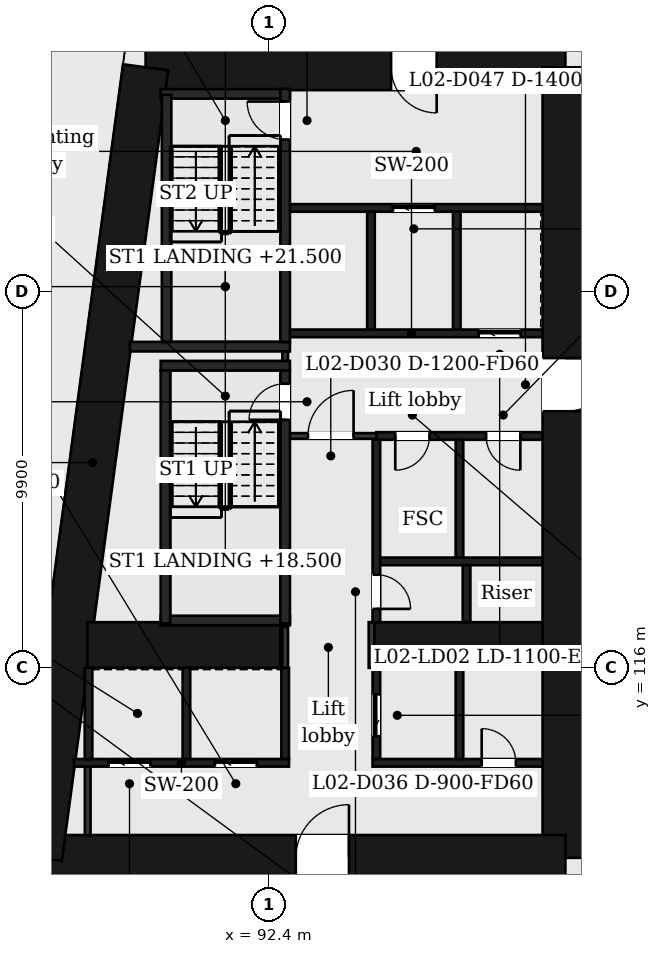
"""IFC4 building model, lengths in metres.
Left out: names, types, materials, properties, quantities, classifications, styles, units other than length and angle.
Written with IfcOpenShell. Run it as: python <this file> out.ifc"""

import sys

from ifc_helpers import new_model, si_unit, direction, frame, frame_2d, origin, place, context, subcontext, project, spatial, rectangle, extrude, element, fill, save


model = new_model("IFC4")
c1 = context("Model", 3, precision=1e-05, world=origin(), true_north=direction((0.0, 1.0)))
c2 = subcontext(c1, "Body", "Model", "MODEL_VIEW")
j1 = project(units=[si_unit("LENGTHUNIT", "METRE"), si_unit("PLANEANGLEUNIT", "RADIAN")], contexts=[c1])
p1 = place(None, origin())
s1 = spatial("IfcSite", under=j1, at=p1, CompositionType="ELEMENT")
p2 = place(p1, origin())
s2 = spatial("IfcBuilding", under=s1, at=p2, CompositionType="ELEMENT")
p3 = place(p2, frame((0.0, 0.0, 17.0)))
s3 = spatial("IfcBuildingStorey", under=s2, at=p3, CompositionType="ELEMENT", Elevation=17.0)
p4 = place(p3, frame((89.156, 131.8, 0.0), z_axis=(0.0, 0.0, 1.0), x_axis=(1.0, 0.0, 0.0)))
e1 = element("IfcWall", 1, at=p4, inside=s3, PredefinedType="SHEAR", context=c2, shape_type="SweptSolid", body=[
    extrude(rectangle(XDim=11.044, YDim=1.2, at=frame_2d((5.522, 0.0))), origin(), (0.0, 0.0, 1.0), 6.0),
])
p5 = place(p4, frame((6.458, 0.0, 0.0)))
e2 = element("IfcOpeningElement", 2, at=p5, cuts=e1, PredefinedType="OPENING", context=c2, shape_type="SweptSolid", body=[
    extrude(rectangle(XDim=1.2, YDim=2.1, at=frame_2d((0.6, 1.05))), frame((0.0, 0.61, 0.0), z_axis=(0.0, -1.0, 0.0), x_axis=(1.0, 0.0, 0.0)), (0.0, 0.0, 1.0), 1.22),
])
p6 = place(p3, frame((100.2, 131.8, 0.0), z_axis=(0.0, 0.0, 1.0), x_axis=(0.0, -1.0, 0.0)))
e3 = element("IfcWall", 3, at=p6, inside=s3, PredefinedType="SHEAR", context=c2, shape_type="SweptSolid", body=[
    extrude(rectangle(XDim=20.8, YDim=1.2, at=frame_2d((10.4, 0.0))), origin(), (0.0, 0.0, 1.0), 6.0),
])
p7 = place(p6, frame((7.65, 0.0, 0.0)))
e4 = element("IfcOpeningElement", 4, at=p7, cuts=e3, PredefinedType="OPENING", context=c2, shape_type="SweptSolid", body=[
    extrude(rectangle(XDim=1.4, YDim=2.1, at=frame_2d((0.7, 1.05))), frame((0.0, 0.61, 0.0), z_axis=(0.0, -1.0, 0.0), x_axis=(1.0, 0.0, 0.0)), (0.0, 0.0, 1.0), 1.22),
])
p8 = place(p3, frame((100.2, 111.0, 0.0), z_axis=(0.0, 0.0, 1.0), x_axis=(-1.0, 0.0, 0.0)))
e5 = element("IfcWall", 5, at=p8, inside=s3, PredefinedType="SHEAR", context=c2, shape_type="SweptSolid", body=[
    extrude(rectangle(XDim=13.844, YDim=1.2, at=frame_2d((6.922, 0.0))), origin(), (0.0, 0.0, 1.0), 6.0),
])
p9 = place(p8, frame((5.694, 0.0, 0.0)))
e6 = element("IfcOpeningElement", 6, at=p9, cuts=e5, PredefinedType="OPENING", context=c2, shape_type="SweptSolid", body=[
    extrude(rectangle(XDim=1.4, YDim=2.1, at=frame_2d((0.7, 1.05))), frame((0.0, 0.61, 0.0), z_axis=(0.0, -1.0, 0.0), x_axis=(1.0, 0.0, 0.0)), (0.0, 0.0, 1.0), 1.22),
])
p10 = place(p3, frame((86.355, 111.0, 0.0), z_axis=(0.0, 0.0, 1.0), x_axis=(0.133413989637, 0.99106039542, 0.0)))
e7 = element("IfcWall", 7, at=p10, inside=s3, PredefinedType="SHEAR", context=c2, shape_type="SweptSolid", body=[
    extrude(rectangle(XDim=20.988, YDim=1.2, at=frame_2d((10.494, 0.0))), origin(), (0.0, 0.0, 1.0), 6.0),
])
p11 = place(p3, frame((87.623, 116.6, 0.0), z_axis=(0.0, 0.0, 1.0), x_axis=(1.0, 0.0, 0.0)))
e8 = element("IfcWall", 8, at=p11, inside=s3, PredefinedType="SHEAR", context=c2, shape_type="SweptSolid", body=[
    extrude(rectangle(XDim=5.077, YDim=1.2, at=frame_2d((2.539, 0.0))), origin(), (0.0, 0.0, 1.0), 6.0),
])
p12 = place(p3, frame((95.1, 116.6, 0.0), z_axis=(0.0, 0.0, 1.0), x_axis=(1.0, 0.0, 0.0)))
e9 = element("IfcWall", 9, at=p12, inside=s3, PredefinedType="SHEAR", context=c2, shape_type="SweptSolid", body=[
    extrude(rectangle(XDim=4.5, YDim=1.2, at=frame_2d((2.25, 0.0))), origin(), (0.0, 0.0, 1.0), 6.0),
])
p13 = place(p3, frame((87.267, 113.5, 0.0), z_axis=(0.0, 0.0, 1.0), x_axis=(1.0, 0.0, 0.0)))
e10 = element("IfcWall", 10, at=p13, inside=s3, PredefinedType="PARTITIONING", context=c2, shape_type="SweptSolid", body=[
    extrude(rectangle(XDim=5.66, YDim=0.2, at=frame_2d((2.83, 0.0))), origin(), (0.0, 0.0, 1.0), 5.5),
])
p14 = place(p13, frame((0.914, 0.0, 0.0)))
e11 = element("IfcOpeningElement", 11, at=p14, cuts=e10, PredefinedType="OPENING", context=c2, shape_type="SweptSolid", body=[
    extrude(rectangle(XDim=1.1, YDim=2.1, at=frame_2d((0.55, 1.05))), frame((0.0, 0.11, 0.0), z_axis=(0.0, -1.0, 0.0), x_axis=(1.0, 0.0, 0.0)), (0.0, 0.0, 1.0), 0.22),
])
p15 = place(p13, frame((3.711, 0.0, 0.0)))
e12 = element("IfcOpeningElement", 12, at=p15, cuts=e10, PredefinedType="OPENING", context=c2, shape_type="SweptSolid", body=[
    extrude(rectangle(XDim=1.1, YDim=2.1, at=frame_2d((0.55, 1.05))), frame((0.0, 0.11, 0.0), z_axis=(0.0, -1.0, 0.0), x_axis=(1.0, 0.0, 0.0)), (0.0, 0.0, 1.0), 0.22),
])
p16 = place(p3, frame((95.127, 113.5, 0.0), z_axis=(0.0, 0.0, 1.0), x_axis=(1.0, 0.0, 0.0)))
e13 = element("IfcWall", 13, at=p16, inside=s3, PredefinedType="PARTITIONING", context=c2, shape_type="SweptSolid", body=[
    extrude(rectangle(XDim=4.473, YDim=0.2, at=frame_2d((2.237, 0.0))), origin(), (0.0, 0.0, 1.0), 5.5),
])
p17 = place(p16, frame((2.871, 0.0, 0.0)))
e14 = element("IfcOpeningElement", 14, at=p17, cuts=e13, PredefinedType="OPENING", context=c2, shape_type="SweptSolid", body=[
    extrude(rectangle(XDim=0.9, YDim=2.1, at=frame_2d((0.45, 1.05))), frame((0.0, 0.11, 0.0), z_axis=(0.0, -1.0, 0.0), x_axis=(1.0, 0.0, 0.0)), (0.0, 0.0, 1.0), 0.22),
])
p18 = place(p3, frame((89.552, 117.245, 0.0), z_axis=(0.0, 0.0, 1.0), x_axis=(1.0, 0.0, 0.0)))
e15 = element("IfcWall", 15, at=p18, inside=s3, PredefinedType="PARTITIONING", context=c2, shape_type="SweptSolid", body=[
    extrude(rectangle(XDim=3.4, YDim=0.25, at=frame_2d((1.7, 0.0))), origin(), (0.0, 0.0, 1.0), 5.5),
])
p19 = place(p3, frame((95.227, 118.8, 0.0), z_axis=(0.0, 0.0, 1.0), x_axis=(1.0, 0.0, 0.0)))
e16 = element("IfcWall", 16, at=p19, inside=s3, PredefinedType="PARTITIONING", context=c2, shape_type="SweptSolid", body=[
    extrude(rectangle(XDim=4.373, YDim=0.2, at=frame_2d((2.187, 0.0))), origin(), (0.0, 0.0, 1.0), 5.5),
])
p20 = place(p3, frame((95.227, 122.1, 0.0), z_axis=(0.0, 0.0, 1.0), x_axis=(1.0, 0.0, 0.0)))
e17 = element("IfcWall", 17, at=p20, inside=s3, PredefinedType="PARTITIONING", context=c2, shape_type="SweptSolid", body=[
    extrude(rectangle(XDim=4.373, YDim=0.2, at=frame_2d((2.187, 0.0))), origin(), (0.0, 0.0, 1.0), 5.5),
])
p21 = place(p20, frame((0.497, 0.0, 0.0)))
e18 = element("IfcOpeningElement", 18, at=p21, cuts=e17, PredefinedType="OPENING", context=c2, shape_type="SweptSolid", body=[
    extrude(rectangle(XDim=0.9, YDim=2.1, at=frame_2d((0.45, 1.05))), frame((0.0, 0.11, 0.0), z_axis=(0.0, -1.0, 0.0), x_axis=(1.0, 0.0, 0.0)), (0.0, 0.0, 1.0), 0.22),
])
p22 = place(p20, frame((2.888, 0.0, 0.0)))
e19 = element("IfcOpeningElement", 19, at=p22, cuts=e17, PredefinedType="OPENING", context=c2, shape_type="SweptSolid", body=[
    extrude(rectangle(XDim=0.9, YDim=2.1, at=frame_2d((0.45, 1.05))), frame((0.0, 0.11, 0.0), z_axis=(0.0, -1.0, 0.0), x_axis=(1.0, 0.0, 0.0)), (0.0, 0.0, 1.0), 0.22),
])
p23 = place(p3, frame((92.827, 122.1, 0.0), z_axis=(0.0, 0.0, 1.0), x_axis=(1.0, 0.0, 0.0)))
e20 = element("IfcWall", 20, at=p23, inside=s3, PredefinedType="PARTITIONING", context=c2, shape_type="SweptSolid", body=[
    extrude(rectangle(XDim=2.4, YDim=0.15, at=frame_2d((1.2, 0.0))), origin(), (0.0, 0.0, 1.0), 5.5),
])
p24 = place(p23, frame((0.6, 0.0, 0.0)))
e21 = element("IfcOpeningElement", 21, at=p24, cuts=e20, PredefinedType="OPENING", context=c2, shape_type="SweptSolid", body=[
    extrude(rectangle(XDim=1.2, YDim=2.1, at=frame_2d((0.6, 1.05))), frame((0.0, 0.085, 0.0), z_axis=(0.0, -1.0, 0.0), x_axis=(1.0, 0.0, 0.0)), (0.0, 0.0, 1.0), 0.17),
])
p25 = place(p3, frame((89.552, 123.95, 0.0), z_axis=(0.0, 0.0, 1.0), x_axis=(1.0, 0.0, 0.0)))
e22 = element("IfcWall", 22, at=p25, inside=s3, PredefinedType="PARTITIONING", context=c2, shape_type="SweptSolid", body=[
    extrude(rectangle(XDim=3.4, YDim=0.25, at=frame_2d((1.7, 0.0))), origin(), (0.0, 0.0, 1.0), 5.5),
])
p26 = place(p3, frame((88.741, 124.45, 0.0), z_axis=(0.0, 0.0, 1.0), x_axis=(1.0, 0.0, 0.0)))
e23 = element("IfcWall", 23, at=p26, inside=s3, PredefinedType="PARTITIONING", context=c2, shape_type="SweptSolid", body=[
    extrude(rectangle(XDim=4.21, YDim=0.25, at=frame_2d((2.105, 0.0))), origin(), (0.0, 0.0, 1.0), 5.5),
])
p27 = place(p3, frame((92.702, 124.8, 0.0), z_axis=(0.0, 0.0, 1.0), x_axis=(1.0, 0.0, 0.0)))
e24 = element("IfcWall", 24, at=p27, inside=s3, PredefinedType="PARTITIONING", context=c2, shape_type="SweptSolid", body=[
    extrude(rectangle(XDim=6.898, YDim=0.2, at=frame_2d((3.449, 0.0))), origin(), (0.0, 0.0, 1.0), 5.5),
])
p28 = place(p27, frame((5.219, 0.0, 0.0)))
e25 = element("IfcOpeningElement", 25, at=p28, cuts=e24, PredefinedType="OPENING", context=c2, shape_type="SweptSolid", body=[
    extrude(rectangle(XDim=1.1, YDim=2.1, at=frame_2d((0.55, 1.05))), frame((0.0, 0.11, 0.0), z_axis=(0.0, -1.0, 0.0), x_axis=(1.0, 0.0, 0.0)), (0.0, 0.0, 1.0), 0.22),
])
p29 = place(p3, frame((92.827, 128.1, 0.0), z_axis=(0.0, 0.0, 1.0), x_axis=(1.0, 0.0, 0.0)))
e26 = element("IfcWall", 26, at=p29, inside=s3, PredefinedType="PARTITIONING", context=c2, shape_type="SweptSolid", body=[
    extrude(rectangle(XDim=6.773, YDim=0.2, at=frame_2d((3.387, 0.0))), origin(), (0.0, 0.0, 1.0), 5.5),
])
p30 = place(p29, frame((2.836, 0.0, 0.0)))
e27 = element("IfcOpeningElement", 27, at=p30, cuts=e26, PredefinedType="OPENING", context=c2, shape_type="SweptSolid", body=[
    extrude(rectangle(XDim=1.1, YDim=2.1, at=frame_2d((0.55, 1.05))), frame((0.0, 0.11, 0.0), z_axis=(0.0, -1.0, 0.0), x_axis=(1.0, 0.0, 0.0)), (0.0, 0.0, 1.0), 0.22),
])
p31 = place(p3, frame((89.552, 131.101, 0.0), z_axis=(0.0, 0.0, 1.0), x_axis=(1.0, 0.0, 0.0)))
e28 = element("IfcWall", 28, at=p31, inside=s3, PredefinedType="PARTITIONING", context=c2, shape_type="SweptSolid", body=[
    extrude(rectangle(XDim=3.4, YDim=0.25, at=frame_2d((1.7, 0.0))), origin(), (0.0, 0.0, 1.0), 5.5),
])
p32 = place(p3, frame((87.653, 113.6, 0.0), z_axis=(0.0, 0.0, 1.0), x_axis=(0.0, 1.0, 0.0)))
e29 = element("IfcWall", 29, at=p32, inside=s3, PredefinedType="PARTITIONING", context=c2, shape_type="SweptSolid", body=[
    extrude(rectangle(XDim=2.4, YDim=0.2, at=frame_2d((1.2, 0.0))), origin(), (0.0, 0.0, 1.0), 5.5),
])
p33 = place(p3, frame((87.631, 111.6, 0.0), z_axis=(0.0, 0.0, 1.0), x_axis=(0.0, 1.0, 0.0)))
e30 = element("IfcWall", 30, at=p33, inside=s3, PredefinedType="PARTITIONING", context=c2, shape_type="SweptSolid", body=[
    extrude(rectangle(XDim=1.8, YDim=0.15, at=frame_2d((0.9, 0.0))), origin(), (0.0, 0.0, 1.0), 5.5),
])
p34 = place(p3, frame((89.677, 117.17, 0.0), z_axis=(0.0, 0.0, 1.0), x_axis=(0.0, 1.0, 0.0)))
e31 = element("IfcWall", 31, at=p34, inside=s3, PredefinedType="PARTITIONING", context=c2, shape_type="SweptSolid", body=[
    extrude(rectangle(XDim=6.655, YDim=0.25, at=frame_2d((3.328, 0.0))), origin(), (0.0, 0.0, 1.0), 5.5),
])
p35 = place(p3, frame((89.707, 124.575, 0.0), z_axis=(0.0, 0.0, 1.0), x_axis=(0.0, 1.0, 0.0)))
e32 = element("IfcWall", 32, at=p35, inside=s3, PredefinedType="PARTITIONING", context=c2, shape_type="SweptSolid", body=[
    extrude(rectangle(XDim=6.5, YDim=0.25, at=frame_2d((3.25, 0.0))), origin(), (0.0, 0.0, 1.0), 5.5),
])
for number, where, z_axis, x_axis in (
    (33, (90.229, 113.6, 0.0), (0.0, 0.0, 1.0), (0.0, 1.0, 0.0)),
    (34, (92.827, 113.6, 0.0), (0.0, 0.0, 1.0), (0.0, 1.0, 0.0)),
):
    element("IfcWall", number, at=place(p3, frame(where, z_axis=z_axis, x_axis=x_axis)), inside=s3, PredefinedType="PARTITIONING", context=c2, shape_type="SweptSolid", body=[
        extrude(rectangle(XDim=2.4, YDim=0.2, at=frame_2d((1.2, 0.0))), origin(), (0.0, 0.0, 1.0), 5.5),
    ])
p36 = place(p3, frame((92.827, 116.0, 0.0), z_axis=(0.0, 0.0, 1.0), x_axis=(0.0, 1.0, 0.0)))
e35 = element("IfcWall", 35, at=p36, inside=s3, PredefinedType="PARTITIONING", context=c2, shape_type="SweptSolid", body=[
    extrude(rectangle(XDim=1.075, YDim=0.15, at=frame_2d((0.538, 0.0))), origin(), (0.0, 0.0, 1.0), 5.5),
])
p37 = place(p3, frame((92.827, 124.075, 0.0), z_axis=(0.0, 0.0, 1.0), x_axis=(0.0, 1.0, 0.0)))
e36 = element("IfcWall", 36, at=p37, inside=s3, PredefinedType="PARTITIONING", context=c2, shape_type="SweptSolid", body=[
    extrude(rectangle(XDim=0.25, YDim=0.15, at=frame_2d((0.125, 0.0))), origin(), (0.0, 0.0, 1.0), 5.5),
])
p38 = place(p3, frame((92.827, 117.17, 0.0), z_axis=(0.0, 0.0, 1.0), x_axis=(0.0, 1.0, 0.0)))
e37 = element("IfcWall", 37, at=p38, inside=s3, PredefinedType="PARTITIONING", context=c2, shape_type="SweptSolid", body=[
    extrude(rectangle(XDim=6.655, YDim=0.25, at=frame_2d((3.328, 0.0))), origin(), (0.0, 0.0, 1.0), 5.5),
])
p39 = place(p38, frame((5.355, 0.0, 0.0)))
e38 = element("IfcOpeningElement", 38, at=p39, cuts=e37, PredefinedType="OPENING", context=c2, shape_type="SweptSolid", body=[
    extrude(rectangle(XDim=0.95, YDim=2.1, at=frame_2d((0.475, 1.05))), frame((0.0, 0.135, 0.0), z_axis=(0.0, -1.0, 0.0), x_axis=(1.0, 0.0, 0.0)), (0.0, 0.0, 1.0), 0.27),
])
p40 = place(p3, frame((92.827, 124.575, 0.0), z_axis=(0.0, 0.0, 1.0), x_axis=(0.0, 1.0, 0.0)))
e39 = element("IfcWall", 39, at=p40, inside=s3, PredefinedType="PARTITIONING", context=c2, shape_type="SweptSolid", body=[
    extrude(rectangle(XDim=6.655, YDim=0.25, at=frame_2d((3.328, 0.0))), origin(), (0.0, 0.0, 1.0), 5.5),
])
p41 = place(p40, frame((5.325, 0.0, 0.0)))
e40 = element("IfcOpeningElement", 40, at=p41, cuts=e39, PredefinedType="OPENING", context=c2, shape_type="SweptSolid", body=[
    extrude(rectangle(XDim=1.0, YDim=2.1, at=frame_2d((0.5, 1.05))), frame((0.0, 0.135, 0.0), z_axis=(0.0, -1.0, 0.0), x_axis=(1.0, 0.0, 0.0)), (0.0, 0.0, 1.0), 0.27),
])
p42 = place(p3, frame((95.085, 124.9, 0.0), z_axis=(0.0, 0.0, 1.0), x_axis=(0.0, 1.0, 0.0)))
e41 = element("IfcWall", 41, at=p42, inside=s3, PredefinedType="PARTITIONING", context=c2, shape_type="SweptSolid", body=[
    extrude(rectangle(XDim=3.1, YDim=0.2, at=frame_2d((1.55, 0.0))), origin(), (0.0, 0.0, 1.0), 5.5),
])
p43 = place(p3, frame((95.1, 116.0, 0.0), z_axis=(0.0, 0.0, 1.0), x_axis=(0.0, 1.0, 0.0)))
e42 = element("IfcWall", 42, at=p43, inside=s3, PredefinedType="PARTITIONING", context=c2, shape_type="SweptSolid", body=[
    extrude(rectangle(XDim=1.2, YDim=0.15, at=frame_2d((0.6, 0.0))), origin(), (0.0, 0.0, 1.0), 5.5),
])
p44 = place(p3, frame((95.227, 113.6, 0.0), z_axis=(0.0, 0.0, 1.0), x_axis=(0.0, 1.0, 0.0)))
e43 = element("IfcWall", 43, at=p44, inside=s3, PredefinedType="PARTITIONING", context=c2, shape_type="SweptSolid", body=[
    extrude(rectangle(XDim=2.4, YDim=0.2, at=frame_2d((1.2, 0.0))), origin(), (0.0, 0.0, 1.0), 5.5),
])
p45 = place(p44, frame((0.6, 0.0, 0.0)))
e44 = element("IfcOpeningElement", 44, at=p45, cuts=e43, PredefinedType="OPENING", context=c2, shape_type="SweptSolid", body=[
    extrude(rectangle(XDim=1.1, YDim=2.1, at=frame_2d((0.55, 1.05))), frame((0.0, 0.11, 0.0), z_axis=(0.0, -1.0, 0.0), x_axis=(1.0, 0.0, 0.0)), (0.0, 0.0, 1.0), 0.22),
])
p46 = place(p3, frame((95.227, 117.2, 0.0), z_axis=(0.0, 0.0, 1.0), x_axis=(0.0, 1.0, 0.0)))
e45 = element("IfcWall", 45, at=p46, inside=s3, PredefinedType="PARTITIONING", context=c2, shape_type="SweptSolid", body=[
    extrude(rectangle(XDim=4.8, YDim=0.2, at=frame_2d((2.4, 0.0))), origin(), (0.0, 0.0, 1.0), 5.5),
])
p47 = place(p46, frame((0.35, 0.0, 0.0)))
e46 = element("IfcOpeningElement", 46, at=p47, cuts=e45, PredefinedType="OPENING", context=c2, shape_type="SweptSolid", body=[
    extrude(rectangle(XDim=0.9, YDim=2.1, at=frame_2d((0.45, 1.05))), frame((0.0, 0.11, 0.0), z_axis=(0.0, -1.0, 0.0), x_axis=(1.0, 0.0, 0.0)), (0.0, 0.0, 1.0), 0.22),
])
p48 = place(p3, frame((97.342, 124.9, 0.0), z_axis=(0.0, 0.0, 1.0), x_axis=(0.0, 1.0, 0.0)))
e47 = element("IfcWall", 47, at=p48, inside=s3, PredefinedType="PARTITIONING", context=c2, shape_type="SweptSolid", body=[
    extrude(rectangle(XDim=3.1, YDim=0.2, at=frame_2d((1.55, 0.0))), origin(), (0.0, 0.0, 1.0), 5.5),
])
p49 = place(p3, frame((97.414, 113.6, 0.0), z_axis=(0.0, 0.0, 1.0), x_axis=(0.0, 1.0, 0.0)))
e48 = element("IfcWall", 48, at=p49, inside=s3, PredefinedType="PARTITIONING", context=c2, shape_type="SweptSolid", body=[
    extrude(rectangle(XDim=2.4, YDim=0.2, at=frame_2d((1.2, 0.0))), origin(), (0.0, 0.0, 1.0), 5.5),
])
p50 = place(p3, frame((97.414, 118.9, 0.0), z_axis=(0.0, 0.0, 1.0), x_axis=(0.0, 1.0, 0.0)))
e49 = element("IfcWall", 49, at=p50, inside=s3, PredefinedType="PARTITIONING", context=c2, shape_type="SweptSolid", body=[
    extrude(rectangle(XDim=3.1, YDim=0.2, at=frame_2d((1.55, 0.0))), origin(), (0.0, 0.0, 1.0), 5.5),
])
p51 = place(p3, frame((97.6, 117.2, 0.0), z_axis=(0.0, 0.0, 1.0), x_axis=(0.0, 1.0, 0.0)))
e50 = element("IfcWall", 50, at=p51, inside=s3, PredefinedType="PARTITIONING", context=c2, shape_type="SweptSolid", body=[
    extrude(rectangle(XDim=1.5, YDim=0.2, at=frame_2d((0.75, 0.0))), origin(), (0.0, 0.0, 1.0), 5.5),
])
p52 = place(p24, origin())
e51 = element("IfcDoor", 51, at=p52, inside=s3, OperationType="SINGLE_SWING_RIGHT", PredefinedType="DOOR", context=c2, shape_type="SweptSolid", body=[
    extrude(rectangle(XDim=1.2, YDim=2.1, at=frame_2d((0.6, 1.05))), frame((0.0, 0.025, 0.0), z_axis=(0.0, -1.0, 0.0), x_axis=(1.0, 0.0, 0.0)), (0.0, 0.0, 1.0), 0.05),
])
fill(e21, e51)
p53 = place(p30, origin())
e52 = element("IfcDoor", 52, at=p53, inside=s3, OperationType="SLIDING_TO_LEFT", PredefinedType="DOOR", context=c2, shape_type="SweptSolid", body=[
    extrude(rectangle(XDim=1.1, YDim=2.1, at=frame_2d((0.55, 1.05))), frame((0.0, 0.025, 0.0), z_axis=(0.0, -1.0, 0.0), x_axis=(1.0, 0.0, 0.0)), (0.0, 0.0, 1.0), 0.05),
])
fill(e27, e52)
p54 = place(p28, origin())
e53 = element("IfcDoor", 53, at=p54, inside=s3, OperationType="SLIDING_TO_LEFT", PredefinedType="DOOR", context=c2, shape_type="SweptSolid", body=[
    extrude(rectangle(XDim=1.1, YDim=2.1, at=frame_2d((0.55, 1.05))), frame((0.0, 0.025, 0.0), z_axis=(0.0, -1.0, 0.0), x_axis=(1.0, 0.0, 0.0)), (0.0, 0.0, 1.0), 0.05),
])
fill(e25, e53)
p55 = place(p21, origin())
e54 = element("IfcDoor", 54, at=p55, inside=s3, OperationType="SINGLE_SWING_LEFT", PredefinedType="DOOR", context=c2, shape_type="SweptSolid", body=[
    extrude(rectangle(XDim=0.9, YDim=2.1, at=frame_2d((0.45, 1.05))), frame((0.0, 0.025, 0.0), z_axis=(0.0, -1.0, 0.0), x_axis=(1.0, 0.0, 0.0)), (0.0, 0.0, 1.0), 0.05),
])
fill(e18, e54)
p56 = place(p22, origin())
e55 = element("IfcDoor", 55, at=p56, inside=s3, OperationType="SINGLE_SWING_RIGHT", PredefinedType="DOOR", context=c2, shape_type="SweptSolid", body=[
    extrude(rectangle(XDim=0.9, YDim=2.1, at=frame_2d((0.45, 1.05))), frame((0.0, 0.025, 0.0), z_axis=(0.0, -1.0, 0.0), x_axis=(1.0, 0.0, 0.0)), (0.0, 0.0, 1.0), 0.05),
])
fill(e19, e55)
p57 = place(p39, origin())
e56 = element("IfcDoor", 56, at=p57, inside=s3, OperationType="SINGLE_SWING_LEFT", PredefinedType="DOOR", context=c2, shape_type="SweptSolid", body=[
    extrude(rectangle(XDim=0.95, YDim=2.1, at=frame_2d((0.475, 1.05))), frame((0.0, 0.025, 0.0), z_axis=(0.0, -1.0, 0.0), x_axis=(1.0, 0.0, 0.0)), (0.0, 0.0, 1.0), 0.05),
])
fill(e38, e56)
p58 = place(p41, origin())
e57 = element("IfcDoor", 57, at=p58, inside=s3, OperationType="SINGLE_SWING_RIGHT", PredefinedType="DOOR", context=c2, shape_type="SweptSolid", body=[
    extrude(rectangle(XDim=1.0, YDim=2.1, at=frame_2d((0.5, 1.05))), frame((0.0, 0.025, 0.0), z_axis=(0.0, -1.0, 0.0), x_axis=(1.0, 0.0, 0.0)), (0.0, 0.0, 1.0), 0.05),
])
fill(e40, e57)
p59 = place(p47, origin())
e58 = element("IfcDoor", 58, at=p59, inside=s3, OperationType="SINGLE_SWING_LEFT", PredefinedType="DOOR", context=c2, shape_type="SweptSolid", body=[
    extrude(rectangle(XDim=0.9, YDim=2.1, at=frame_2d((0.45, 1.05))), frame((0.0, 0.025, 0.0), z_axis=(0.0, -1.0, 0.0), x_axis=(1.0, 0.0, 0.0)), (0.0, 0.0, 1.0), 0.05),
])
fill(e46, e58)
p60 = place(p14, origin())
e59 = element("IfcDoor", 59, at=p60, inside=s3, OperationType="SLIDING_TO_LEFT", PredefinedType="DOOR", context=c2, shape_type="SweptSolid", body=[
    extrude(rectangle(XDim=1.1, YDim=2.1, at=frame_2d((0.55, 1.05))), frame((0.0, 0.025, 0.0), z_axis=(0.0, -1.0, 0.0), x_axis=(1.0, 0.0, 0.0)), (0.0, 0.0, 1.0), 0.05),
])
fill(e11, e59)
p61 = place(p15, origin())
e60 = element("IfcDoor", 60, at=p61, inside=s3, OperationType="SLIDING_TO_LEFT", PredefinedType="DOOR", context=c2, shape_type="SweptSolid", body=[
    extrude(rectangle(XDim=1.1, YDim=2.1, at=frame_2d((0.55, 1.05))), frame((0.0, 0.025, 0.0), z_axis=(0.0, -1.0, 0.0), x_axis=(1.0, 0.0, 0.0)), (0.0, 0.0, 1.0), 0.05),
])
fill(e12, e60)
p62 = place(p45, origin())
e61 = element("IfcDoor", 61, at=p62, inside=s3, OperationType="SLIDING_TO_LEFT", PredefinedType="DOOR", context=c2, shape_type="SweptSolid", body=[
    extrude(rectangle(XDim=1.1, YDim=2.1, at=frame_2d((0.55, 1.05))), frame((0.0, 0.025, 0.0), z_axis=(0.0, -1.0, 0.0), x_axis=(1.0, 0.0, 0.0)), (0.0, 0.0, 1.0), 0.05),
])
fill(e44, e61)
p63 = place(p17, origin())
e62 = element("IfcDoor", 62, at=p63, inside=s3, OperationType="SINGLE_SWING_LEFT", PredefinedType="DOOR", context=c2, shape_type="SweptSolid", body=[
    extrude(rectangle(XDim=0.9, YDim=2.1, at=frame_2d((0.45, 1.05))), frame((0.0, 0.025, 0.0), z_axis=(0.0, -1.0, 0.0), x_axis=(1.0, 0.0, 0.0)), (0.0, 0.0, 1.0), 0.05),
])
fill(e14, e62)
p64 = place(p9, origin())
e63 = element("IfcDoor", 63, at=p64, inside=s3, OperationType="SINGLE_SWING_LEFT", PredefinedType="DOOR", context=c2, shape_type="SweptSolid", body=[
    extrude(rectangle(XDim=1.4, YDim=2.1, at=frame_2d((0.7, 1.05))), frame((0.0, 0.025, 0.0), z_axis=(0.0, -1.0, 0.0), x_axis=(1.0, 0.0, 0.0)), (0.0, 0.0, 1.0), 0.05),
])
fill(e6, e63)
p65 = place(p5, origin())
e64 = element("IfcDoor", 64, at=p65, inside=s3, OperationType="SINGLE_SWING_RIGHT", PredefinedType="DOOR", context=c2, shape_type="SweptSolid", body=[
    extrude(rectangle(XDim=1.2, YDim=2.1, at=frame_2d((0.6, 1.05))), frame((0.0, 0.025, 0.0), z_axis=(0.0, -1.0, 0.0), x_axis=(1.0, 0.0, 0.0)), (0.0, 0.0, 1.0), 0.05),
])
fill(e2, e64)
p66 = place(p7, origin())
e65 = element("IfcDoor", 65, at=p66, inside=s3, OperationType="SINGLE_SWING_LEFT", PredefinedType="DOOR", context=c2, shape_type="SweptSolid", body=[
    extrude(rectangle(XDim=1.4, YDim=2.1, at=frame_2d((0.7, 1.05))), frame((0.0, 0.025, 0.0), z_axis=(0.0, -1.0, 0.0), x_axis=(1.0, 0.0, 0.0)), (0.0, 0.0, 1.0), 0.05),
])
fill(e4, e65)
save(model, sys.argv[1])
